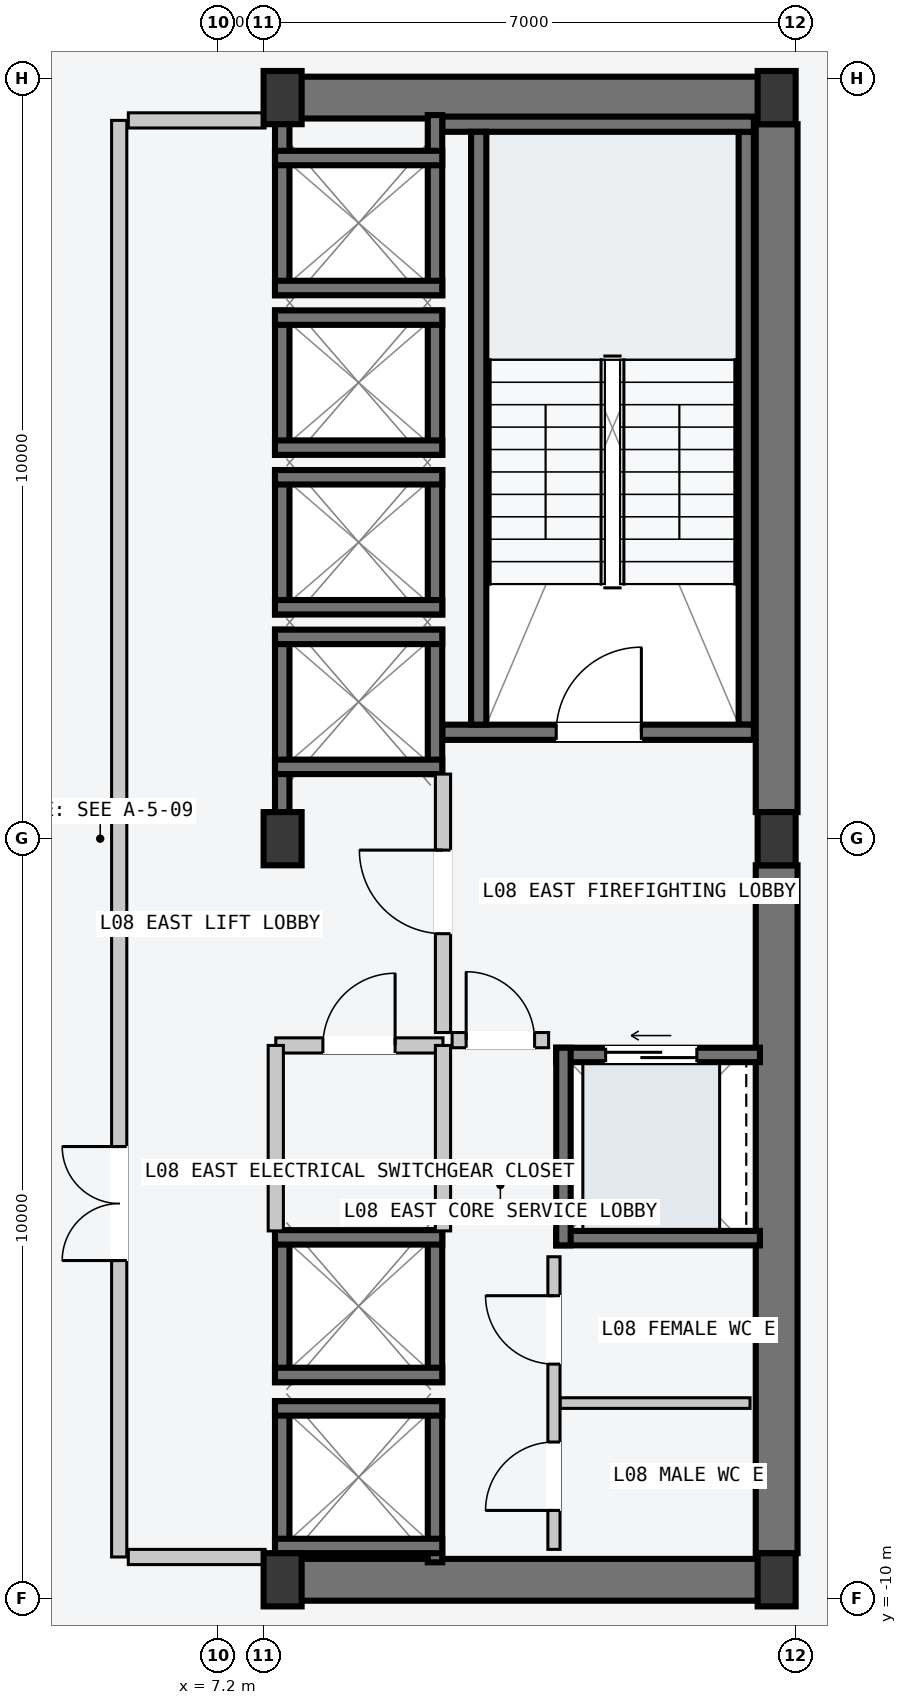
"""IFC4 building model, lengths in metres.
Left out: names, types, materials, properties, quantities, classifications, styles, units other than length and angle.
Written with IfcOpenShell. Run it as: python <this file> out.ifc"""

import sys

from ifc_helpers import new_model, si_unit, direction, frame, frame_2d, origin, origin_2d, place, context, subcontext, project, spatial, rectangle, i_section, extrude, element, fill, save


model = new_model("IFC4")
c1 = context("Model", 3, precision=1e-05, world=origin(), true_north=direction((0.0, 1.0)))
c2 = subcontext(c1, "Body", "Model", "MODEL_VIEW")
j1 = project(units=[si_unit("LENGTHUNIT", "METRE"), si_unit("PLANEANGLEUNIT", "RADIAN")], contexts=[c1])
p1 = place(None, origin())
s1 = spatial("IfcSite", under=j1, at=p1, CompositionType="ELEMENT")
p2 = place(p1, origin())
s2 = spatial("IfcBuilding", under=s1, at=p2, CompositionType="ELEMENT")
p3 = place(p2, frame((0.0, 0.0, 34.8)))
s3 = spatial("IfcBuildingStorey", under=s2, at=p3, CompositionType="ELEMENT", Elevation=34.8)
for number, where, z_axis, x_axis in (
    (1, (8.07, -9.75, -0.2), (0.0, 0.0, 1.0), (1.0, 0.0, 0.0)),
    (2, (8.07, 9.75, -0.2), (0.0, 0.0, 1.0), (1.0, 0.0, 0.0)),
):
    element("IfcWall", number, at=place(p3, frame(where, z_axis=z_axis, x_axis=x_axis)), inside=s3, PredefinedType="SHEAR", context=c2, shape_type="SweptSolid", body=[
        extrude(rectangle(XDim=6.46, YDim=0.55, at=frame_2d((3.23, 0.0))), origin(), (0.0, 0.0, 1.0), 3.6),
    ])
for number, where, z_axis, x_axis in (
    (3, (14.55, -9.4, -0.2), (0.0, 0.0, 1.0), (0.0, 1.0, 0.0)),
    (4, (14.55, 0.35, -0.2), (0.0, 0.0, 1.0), (0.0, 1.0, 0.0)),
):
    element("IfcWall", number, at=place(p3, frame(where, z_axis=z_axis, x_axis=x_axis)), inside=s3, PredefinedType="SHEAR", context=c2, shape_type="SweptSolid", body=[
        extrude(rectangle(XDim=9.05, YDim=0.55, at=frame_2d((4.525, 0.0))), origin(), (0.0, 0.0, 1.0), 3.6),
    ])
p4 = place(p3, frame((14.15, 1.5, -0.2), z_axis=(0.0, 0.0, 1.0), x_axis=(0.0, 1.0, 0.0)))
e5 = element("IfcWall", 5, at=p4, inside=s3, PredefinedType="SOLIDWALL", context=c2, shape_type="SweptSolid", body=[
    extrude(rectangle(XDim=7.8, YDim=0.2, at=frame_2d((3.9, 0.0))), origin(), (0.0, 0.0, 1.0), 3.6),
])
p5 = place(p3, frame((10.15, 1.4, -0.2), z_axis=(0.0, 0.0, 1.0), x_axis=(1.0, 0.0, 0.0)))
e6 = element("IfcWall", 6, at=p5, inside=s3, PredefinedType="SOLIDWALL", context=c2, shape_type="SweptSolid", body=[
    extrude(rectangle(XDim=4.1, YDim=0.2, at=frame_2d((2.05, 0.0))), origin(), (0.0, 0.0, 1.0), 3.6),
])
p6 = place(p5, frame((1.5, 0.0, 0.2)))
e7 = element("IfcOpeningElement", 7, at=p6, cuts=e6, PredefinedType="OPENING", context=c2, shape_type="SweptSolid", body=[
    extrude(rectangle(XDim=1.12, YDim=2.18, at=frame_2d((0.56, 1.09))), frame((0.0, 0.11, 0.0), z_axis=(0.0, -1.0, 0.0), x_axis=(1.0, 0.0, 0.0)), (0.0, 0.0, 1.0), 0.22),
])
p7 = place(p3, frame((10.15, 9.4, -0.2), z_axis=(0.0, 0.0, 1.0), x_axis=(1.0, 0.0, 0.0)))
e8 = element("IfcWall", 8, at=p7, inside=s3, PredefinedType="SOLIDWALL", context=c2, shape_type="SweptSolid", body=[
    extrude(rectangle(XDim=4.1, YDim=0.2, at=frame_2d((2.05, 0.0))), origin(), (0.0, 0.0, 1.0), 3.6),
])
p8 = place(p3, frame((10.63, 1.5, -0.2), z_axis=(0.0, 0.0, 1.0), x_axis=(0.0, 1.0, 0.0)))
e9 = element("IfcWall", 9, at=p8, inside=s3, PredefinedType="SOLIDWALL", context=c2, shape_type="SweptSolid", body=[
    extrude(rectangle(XDim=7.8, YDim=0.2, at=frame_2d((3.9, 0.0))), origin(), (0.0, 0.0, 1.0), 3.6),
])
for number, where, z_axis, x_axis in (
    (10, (8.05, -9.75, 0.0), (0.0, 0.0, 1.0), (1.0, 0.0, 0.0)),
    (11, (8.05, 0.0, 0.0), (0.0, 0.0, 1.0), (1.0, 0.0, 0.0)),
    (12, (8.05, 9.75, 0.0), (0.0, 0.0, 1.0), (1.0, 0.0, 0.0)),
    (13, (14.55, -9.75, 0.0), (0.0, 0.0, 1.0), (1.0, 0.0, 0.0)),
    (14, (14.55, 0.0, 0.0), (0.0, 0.0, 1.0), (1.0, 0.0, 0.0)),
    (15, (14.55, 9.75, 0.0), (0.0, 0.0, 1.0), (1.0, 0.0, 0.0)),
):
    element("IfcColumn", number, at=place(p3, frame(where, z_axis=z_axis, x_axis=x_axis)), inside=s3, PredefinedType="COLUMN", context=c2, shape_type="SweptSolid", body=[
        extrude(i_section(OverallWidth=0.5, OverallDepth=0.7, WebThickness=0.028, FlangeThickness=0.045, at=origin_2d()), origin(), (0.0, 0.0, 1.0), 3.6),
    ])
p9 = place(p3, frame((8.045, 0.21, -0.2), z_axis=(0.0, 0.0, 1.0), x_axis=(0.0, 1.0, 0.0)))
e16 = element("IfcWall", 16, at=p9, inside=s3, PredefinedType="SOLIDWALL", context=c2, shape_type="SweptSolid", body=[
    extrude(rectangle(XDim=2.54, YDim=0.19, at=frame_2d((1.27, 0.0))), origin(), (0.0, 0.0, 1.0), 3.6),
])
p10 = place(p3, frame((10.055, 0.85, -0.2), z_axis=(0.0, 0.0, 1.0), x_axis=(0.0, 1.0, 0.0)))
e17 = element("IfcWall", 17, at=p10, inside=s3, PredefinedType="SOLIDWALL", context=c2, shape_type="SweptSolid", body=[
    extrude(rectangle(XDim=1.9, YDim=0.19, at=frame_2d((0.95, 0.0))), origin(), (0.0, 0.0, 1.0), 3.6),
])
for number, where, z_axis, x_axis in (
    (18, (7.95, 2.655, -0.2), (0.0, 0.0, 1.0), (1.0, 0.0, 0.0)),
    (19, (7.95, 0.945, -0.2), (0.0, 0.0, 1.0), (1.0, 0.0, 0.0)),
):
    element("IfcWall", number, at=place(p3, frame(where, z_axis=z_axis, x_axis=x_axis)), inside=s3, PredefinedType="SOLIDWALL", context=c2, shape_type="SweptSolid", body=[
        extrude(rectangle(XDim=2.2, YDim=0.19, at=frame_2d((1.1, 0.0))), origin(), (0.0, 0.0, 1.0), 3.6),
    ])
for number, where, z_axis, x_axis in (
    (20, (8.045, 2.95, -0.2), (0.0, 0.0, 1.0), (0.0, 1.0, 0.0)),
    (21, (10.055, 2.95, -0.2), (0.0, 0.0, 1.0), (0.0, 1.0, 0.0)),
):
    element("IfcWall", number, at=place(p3, frame(where, z_axis=z_axis, x_axis=x_axis)), inside=s3, PredefinedType="SOLIDWALL", context=c2, shape_type="SweptSolid", body=[
        extrude(rectangle(XDim=1.9, YDim=0.19, at=frame_2d((0.95, 0.0))), origin(), (0.0, 0.0, 1.0), 3.6),
    ])
for number, where, z_axis, x_axis in (
    (22, (7.95, 4.755, -0.2), (0.0, 0.0, 1.0), (1.0, 0.0, 0.0)),
    (23, (7.95, 3.045, -0.2), (0.0, 0.0, 1.0), (1.0, 0.0, 0.0)),
):
    element("IfcWall", number, at=place(p3, frame(where, z_axis=z_axis, x_axis=x_axis)), inside=s3, PredefinedType="SOLIDWALL", context=c2, shape_type="SweptSolid", body=[
        extrude(rectangle(XDim=2.2, YDim=0.19, at=frame_2d((1.1, 0.0))), origin(), (0.0, 0.0, 1.0), 3.6),
    ])
for number, where, z_axis, x_axis in (
    (24, (8.045, 5.05, -0.2), (0.0, 0.0, 1.0), (0.0, 1.0, 0.0)),
    (25, (10.055, 5.05, -0.2), (0.0, 0.0, 1.0), (0.0, 1.0, 0.0)),
):
    element("IfcWall", number, at=place(p3, frame(where, z_axis=z_axis, x_axis=x_axis)), inside=s3, PredefinedType="SOLIDWALL", context=c2, shape_type="SweptSolid", body=[
        extrude(rectangle(XDim=1.9, YDim=0.19, at=frame_2d((0.95, 0.0))), origin(), (0.0, 0.0, 1.0), 3.6),
    ])
for number, where, z_axis, x_axis in (
    (26, (7.95, 6.855, -0.2), (0.0, 0.0, 1.0), (1.0, 0.0, 0.0)),
    (27, (7.95, 5.145, -0.2), (0.0, 0.0, 1.0), (1.0, 0.0, 0.0)),
):
    element("IfcWall", number, at=place(p3, frame(where, z_axis=z_axis, x_axis=x_axis)), inside=s3, PredefinedType="SOLIDWALL", context=c2, shape_type="SweptSolid", body=[
        extrude(rectangle(XDim=2.2, YDim=0.19, at=frame_2d((1.1, 0.0))), origin(), (0.0, 0.0, 1.0), 3.6),
    ])
for number, where, z_axis, x_axis in (
    (28, (8.045, 7.15, -0.2), (0.0, 0.0, 1.0), (0.0, 1.0, 0.0)),
    (29, (10.055, 7.15, -0.2), (0.0, 0.0, 1.0), (0.0, 1.0, 0.0)),
):
    element("IfcWall", number, at=place(p3, frame(where, z_axis=z_axis, x_axis=x_axis)), inside=s3, PredefinedType="SOLIDWALL", context=c2, shape_type="SweptSolid", body=[
        extrude(rectangle(XDim=2.37, YDim=0.19, at=frame_2d((1.185, 0.0))), origin(), (0.0, 0.0, 1.0), 3.6),
    ])
for number, where, z_axis, x_axis in (
    (30, (7.95, 8.955, -0.2), (0.0, 0.0, 1.0), (1.0, 0.0, 0.0)),
    (31, (7.95, 7.245, -0.2), (0.0, 0.0, 1.0), (1.0, 0.0, 0.0)),
):
    element("IfcWall", number, at=place(p3, frame(where, z_axis=z_axis, x_axis=x_axis)), inside=s3, PredefinedType="SOLIDWALL", context=c2, shape_type="SweptSolid", body=[
        extrude(rectangle(XDim=2.2, YDim=0.19, at=frame_2d((1.1, 0.0))), origin(), (0.0, 0.0, 1.0), 3.6),
    ])
for number, where, z_axis, x_axis in (
    (32, (8.045, -9.52, -0.2), (0.0, 0.0, 1.0), (0.0, 1.0, 0.0)),
    (33, (10.055, -9.52, -0.2), (0.0, 0.0, 1.0), (0.0, 1.0, 0.0)),
):
    element("IfcWall", number, at=place(p3, frame(where, z_axis=z_axis, x_axis=x_axis)), inside=s3, PredefinedType="SOLIDWALL", context=c2, shape_type="SweptSolid", body=[
        extrude(rectangle(XDim=2.12, YDim=0.19, at=frame_2d((1.06, 0.0))), origin(), (0.0, 0.0, 1.0), 3.6),
    ])
for number, where, z_axis, x_axis in (
    (34, (7.95, -7.495, -0.2), (0.0, 0.0, 1.0), (1.0, 0.0, 0.0)),
    (35, (7.95, -9.305, -0.2), (0.0, 0.0, 1.0), (1.0, 0.0, 0.0)),
):
    element("IfcWall", number, at=place(p3, frame(where, z_axis=z_axis, x_axis=x_axis)), inside=s3, PredefinedType="SOLIDWALL", context=c2, shape_type="SweptSolid", body=[
        extrude(rectangle(XDim=2.2, YDim=0.19, at=frame_2d((1.1, 0.0))), origin(), (0.0, 0.0, 1.0), 3.6),
    ])
for number, where, z_axis, x_axis in (
    (36, (8.045, -7.15, -0.2), (0.0, 0.0, 1.0), (0.0, 1.0, 0.0)),
    (37, (10.055, -7.15, -0.2), (0.0, 0.0, 1.0), (0.0, 1.0, 0.0)),
):
    element("IfcWall", number, at=place(p3, frame(where, z_axis=z_axis, x_axis=x_axis)), inside=s3, PredefinedType="SOLIDWALL", context=c2, shape_type="SweptSolid", body=[
        extrude(rectangle(XDim=2.0, YDim=0.19, at=frame_2d((1.0, 0.0))), origin(), (0.0, 0.0, 1.0), 3.6),
    ])
for number, where, z_axis, x_axis in (
    (38, (7.95, -5.245, -0.2), (0.0, 0.0, 1.0), (1.0, 0.0, 0.0)),
    (39, (7.95, -7.055, -0.2), (0.0, 0.0, 1.0), (1.0, 0.0, 0.0)),
):
    element("IfcWall", number, at=place(p3, frame(where, z_axis=z_axis, x_axis=x_axis)), inside=s3, PredefinedType="SOLIDWALL", context=c2, shape_type="SweptSolid", body=[
        extrude(rectangle(XDim=2.2, YDim=0.19, at=frame_2d((1.1, 0.0))), origin(), (0.0, 0.0, 1.0), 3.6),
    ])
p11 = place(p3, frame((11.65, -2.845, -0.2), z_axis=(0.0, 0.0, 1.0), x_axis=(1.0, 0.0, 0.0)))
e40 = element("IfcWall", 40, at=p11, inside=s3, PredefinedType="SOLIDWALL", context=c2, shape_type="SweptSolid", body=[
    extrude(rectangle(XDim=2.68, YDim=0.19, at=frame_2d((1.34, 0.0))), origin(), (0.0, 0.0, 1.0), 3.6),
])
p12 = place(p11, frame((0.65, 0.0, 0.2)))
e41 = element("IfcOpeningElement", 41, at=p12, cuts=e40, PredefinedType="OPENING", context=c2, shape_type="SweptSolid", body=[
    extrude(rectangle(XDim=1.2, YDim=2.2, at=frame_2d((0.6, 1.1))), frame((0.0, 0.105, 0.0), z_axis=(0.0, -1.0, 0.0), x_axis=(1.0, 0.0, 0.0)), (0.0, 0.0, 1.0), 0.21),
])
p13 = place(p3, frame((11.65, -5.255, -0.2), z_axis=(0.0, 0.0, 1.0), x_axis=(1.0, 0.0, 0.0)))
e42 = element("IfcWall", 42, at=p13, inside=s3, PredefinedType="SOLIDWALL", context=c2, shape_type="SweptSolid", body=[
    extrude(rectangle(XDim=2.68, YDim=0.19, at=frame_2d((1.34, 0.0))), origin(), (0.0, 0.0, 1.0), 3.6),
])
p14 = place(p3, frame((11.745, -5.35, -0.2), z_axis=(0.0, 0.0, 1.0), x_axis=(0.0, 1.0, 0.0)))
e43 = element("IfcWall", 43, at=p14, inside=s3, PredefinedType="SOLIDWALL", context=c2, shape_type="SweptSolid", body=[
    extrude(rectangle(XDim=2.6, YDim=0.19, at=frame_2d((1.3, 0.0))), origin(), (0.0, 0.0, 1.0), 3.6),
])
p15 = place(p3, frame((5.9, -9.45, 0.0), z_axis=(0.0, 0.0, 1.0), x_axis=(0.0, 1.0, 0.0)))
e44 = element("IfcWall", 44, at=p15, inside=s3, PredefinedType="PARTITIONING", context=c2, shape_type="SweptSolid", body=[
    extrude(rectangle(XDim=18.9, YDim=0.2, at=frame_2d((9.45, 0.0))), origin(), (0.0, 0.0, 1.0), 3.4),
])
p16 = place(p15, frame((3.9, 0.0, 0.0)))
e45 = element("IfcOpeningElement", 45, at=p16, cuts=e44, PredefinedType="OPENING", context=c2, shape_type="SweptSolid", body=[
    extrude(rectangle(XDim=1.5, YDim=2.2, at=frame_2d((0.75, 1.1))), frame((0.0, 0.11, 0.0), z_axis=(0.0, -1.0, 0.0), x_axis=(1.0, 0.0, 0.0)), (0.0, 0.0, 1.0), 0.22),
])
for number, where, z_axis, x_axis in (
    (46, (6.02, -9.45, 0.0), (0.0, 0.0, 1.0), (1.0, 0.0, 0.0)),
    (47, (6.02, 9.45, 0.0), (0.0, 0.0, 1.0), (1.0, 0.0, 0.0)),
):
    element("IfcWall", number, at=place(p3, frame(where, z_axis=z_axis, x_axis=x_axis)), inside=s3, PredefinedType="PARTITIONING", context=c2, shape_type="SweptSolid", body=[
        extrude(rectangle(XDim=1.8, YDim=0.2, at=frame_2d((0.9, 0.0))), origin(), (0.0, 0.0, 1.0), 3.4),
    ])
p17 = place(p3, frame((10.16, -2.55, 0.0), z_axis=(0.0, 0.0, 1.0), x_axis=(0.0, 1.0, 0.0)))
e48 = element("IfcWall", 48, at=p17, inside=s3, PredefinedType="PARTITIONING", context=c2, shape_type="SweptSolid", body=[
    extrude(rectangle(XDim=3.4, YDim=0.2, at=frame_2d((1.7, 0.0))), origin(), (0.0, 0.0, 1.0), 3.4),
])
p18 = place(p17, frame((1.3, 0.0, 0.0)))
e49 = element("IfcOpeningElement", 49, at=p18, cuts=e48, PredefinedType="OPENING", context=c2, shape_type="SweptSolid", body=[
    extrude(rectangle(XDim=1.1, YDim=2.15, at=frame_2d((0.55, 1.075))), frame((0.0, 0.11, 0.0), z_axis=(0.0, -1.0, 0.0), x_axis=(1.0, 0.0, 0.0)), (0.0, 0.0, 1.0), 0.22),
])
p19 = place(p3, frame((10.28, -2.65, 0.0), z_axis=(0.0, 0.0, 1.0), x_axis=(1.0, 0.0, 0.0)))
e50 = element("IfcWall", 50, at=p19, inside=s3, PredefinedType="PARTITIONING", context=c2, shape_type="SweptSolid", body=[
    extrude(rectangle(XDim=1.27, YDim=0.2, at=frame_2d((0.635, 0.0))), origin(), (0.0, 0.0, 1.0), 3.4),
])
p20 = place(p19, frame((0.185, 0.0, 0.0)))
e51 = element("IfcOpeningElement", 51, at=p20, cuts=e50, PredefinedType="OPENING", context=c2, shape_type="SweptSolid", body=[
    extrude(rectangle(XDim=0.9, YDim=2.15, at=frame_2d((0.45, 1.075))), frame((0.0, 0.11, 0.0), z_axis=(0.0, -1.0, 0.0), x_axis=(1.0, 0.0, 0.0)), (0.0, 0.0, 1.0), 0.22),
])
p21 = place(p3, frame((7.96, -2.72, 0.0), z_axis=(0.0, 0.0, 1.0), x_axis=(1.0, 0.0, 0.0)))
e52 = element("IfcWall", 52, at=p21, inside=s3, PredefinedType="PARTITIONING", context=c2, shape_type="SweptSolid", body=[
    extrude(rectangle(XDim=2.2, YDim=0.2, at=frame_2d((1.1, 0.0))), origin(), (0.0, 0.0, 1.0), 3.4),
])
p22 = place(p21, frame((0.62, 0.0, 0.0)))
e53 = element("IfcOpeningElement", 53, at=p22, cuts=e52, PredefinedType="OPENING", context=c2, shape_type="SweptSolid", body=[
    extrude(rectangle(XDim=0.95, YDim=2.1, at=frame_2d((0.475, 1.05))), frame((0.0, 0.11, 0.0), z_axis=(0.0, -1.0, 0.0), x_axis=(1.0, 0.0, 0.0)), (0.0, 0.0, 1.0), 0.22),
])
for number, where, z_axis, x_axis in (
    (54, (7.96, -5.16, 0.0), (0.0, 0.0, 1.0), (0.0, 1.0, 0.0)),
    (55, (10.16, -5.16, 0.0), (0.0, 0.0, 1.0), (0.0, 1.0, 0.0)),
):
    element("IfcWall", number, at=place(p3, frame(where, z_axis=z_axis, x_axis=x_axis)), inside=s3, PredefinedType="PARTITIONING", context=c2, shape_type="SweptSolid", body=[
        extrude(rectangle(XDim=2.44, YDim=0.2, at=frame_2d((1.22, 0.0))), origin(), (0.0, 0.0, 1.0), 3.4),
    ])
p23 = place(p3, frame((11.7, -7.425, 0.0), z_axis=(0.0, 0.0, 1.0), x_axis=(1.0, 0.0, 0.0)))
e56 = element("IfcWall", 56, at=p23, inside=s3, PredefinedType="PARTITIONING", context=c2, shape_type="SweptSolid", body=[
    extrude(rectangle(XDim=2.5, YDim=0.14, at=frame_2d((1.25, 0.0))), origin(), (0.0, 0.0, 1.0), 3.4),
])
p24 = place(p3, frame((11.62, -9.35, 0.0), z_axis=(0.0, 0.0, 1.0), x_axis=(0.0, 1.0, 0.0)))
e57 = element("IfcWall", 57, at=p24, inside=s3, PredefinedType="PARTITIONING", context=c2, shape_type="SweptSolid", body=[
    extrude(rectangle(XDim=3.85, YDim=0.16, at=frame_2d((1.925, 0.0))), origin(), (0.0, 0.0, 1.0), 3.4),
])
p25 = place(p24, frame((0.512, 0.0, 0.0)))
e58 = element("IfcOpeningElement", 58, at=p25, cuts=e57, PredefinedType="OPENING", context=c2, shape_type="SweptSolid", body=[
    extrude(rectangle(XDim=0.9, YDim=2.15, at=frame_2d((0.45, 1.075))), frame((0.0, 0.09, 0.0), z_axis=(0.0, -1.0, 0.0), x_axis=(1.0, 0.0, 0.0)), (0.0, 0.0, 1.0), 0.18),
])
p26 = place(p24, frame((2.438, 0.0, 0.0)))
e59 = element("IfcOpeningElement", 59, at=p26, cuts=e57, PredefinedType="OPENING", context=c2, shape_type="SweptSolid", body=[
    extrude(rectangle(XDim=0.9, YDim=2.15, at=frame_2d((0.45, 1.075))), frame((0.0, 0.09, 0.0), z_axis=(0.0, -1.0, 0.0), x_axis=(1.0, 0.0, 0.0)), (0.0, 0.0, 1.0), 0.18),
])
p27 = place(p6, origin())
e60 = element("IfcDoor", 60, at=p27, inside=s3, OperationType="SINGLE_SWING_RIGHT", PredefinedType="DOOR", context=c2, shape_type="SweptSolid", body=[
    extrude(rectangle(XDim=1.12, YDim=2.18, at=frame_2d((0.56, 1.09))), frame((0.0, 0.025, 0.0), z_axis=(0.0, -1.0, 0.0), x_axis=(1.0, 0.0, 0.0)), (0.0, 0.0, 1.0), 0.05),
])
fill(e7, e60)
p28 = place(p12, origin())
e61 = element("IfcDoor", 61, at=p28, inside=s3, OperationType="SLIDING_TO_LEFT", PredefinedType="DOOR", context=c2, shape_type="SweptSolid", body=[
    extrude(rectangle(XDim=1.2, YDim=2.2, at=frame_2d((0.6, 1.1))), frame((0.0, 0.025, 0.0), z_axis=(0.0, -1.0, 0.0), x_axis=(1.0, 0.0, 0.0)), (0.0, 0.0, 1.0), 0.05),
])
fill(e41, e61)
p29 = place(p16, origin())
e62 = element("IfcDoor", 62, at=p29, inside=s3, OperationType="DOUBLE_DOOR_SINGLE_SWING", PredefinedType="DOOR", context=c2, shape_type="SweptSolid", body=[
    extrude(rectangle(XDim=1.5, YDim=2.2, at=frame_2d((0.75, 1.1))), frame((0.0, 0.025, 0.0), z_axis=(0.0, -1.0, 0.0), x_axis=(1.0, 0.0, 0.0)), (0.0, 0.0, 1.0), 0.05),
])
fill(e45, e62)
p30 = place(p18, origin())
e63 = element("IfcDoor", 63, at=p30, inside=s3, OperationType="SINGLE_SWING_RIGHT", PredefinedType="DOOR", context=c2, shape_type="SweptSolid", body=[
    extrude(rectangle(XDim=1.1, YDim=2.15, at=frame_2d((0.55, 1.075))), frame((0.0, 0.025, 0.0), z_axis=(0.0, -1.0, 0.0), x_axis=(1.0, 0.0, 0.0)), (0.0, 0.0, 1.0), 0.05),
])
fill(e49, e63)
p31 = place(p20, origin())
e64 = element("IfcDoor", 64, at=p31, inside=s3, OperationType="SINGLE_SWING_LEFT", PredefinedType="DOOR", context=c2, shape_type="SweptSolid", body=[
    extrude(rectangle(XDim=0.9, YDim=2.15, at=frame_2d((0.45, 1.075))), frame((0.0, 0.025, 0.0), z_axis=(0.0, -1.0, 0.0), x_axis=(1.0, 0.0, 0.0)), (0.0, 0.0, 1.0), 0.05),
])
fill(e51, e64)
p32 = place(p22, origin())
e65 = element("IfcDoor", 65, at=p32, inside=s3, OperationType="SINGLE_SWING_RIGHT", PredefinedType="DOOR", context=c2, shape_type="SweptSolid", body=[
    extrude(rectangle(XDim=0.95, YDim=2.1, at=frame_2d((0.475, 1.05))), frame((0.0, 0.025, 0.0), z_axis=(0.0, -1.0, 0.0), x_axis=(1.0, 0.0, 0.0)), (0.0, 0.0, 1.0), 0.05),
])
fill(e53, e65)
p33 = place(p25, origin())
e66 = element("IfcDoor", 66, at=p33, inside=s3, OperationType="SINGLE_SWING_LEFT", PredefinedType="DOOR", context=c2, shape_type="SweptSolid", body=[
    extrude(rectangle(XDim=0.9, YDim=2.15, at=frame_2d((0.45, 1.075))), frame((0.0, 0.025, 0.0), z_axis=(0.0, -1.0, 0.0), x_axis=(1.0, 0.0, 0.0)), (0.0, 0.0, 1.0), 0.05),
])
fill(e58, e66)
p34 = place(p26, origin())
e67 = element("IfcDoor", 67, at=p34, inside=s3, OperationType="SINGLE_SWING_RIGHT", PredefinedType="DOOR", context=c2, shape_type="SweptSolid", body=[
    extrude(rectangle(XDim=0.9, YDim=2.15, at=frame_2d((0.45, 1.075))), frame((0.0, 0.025, 0.0), z_axis=(0.0, -1.0, 0.0), x_axis=(1.0, 0.0, 0.0)), (0.0, 0.0, 1.0), 0.05),
])
fill(e59, e67)
save(model, sys.argv[1])
